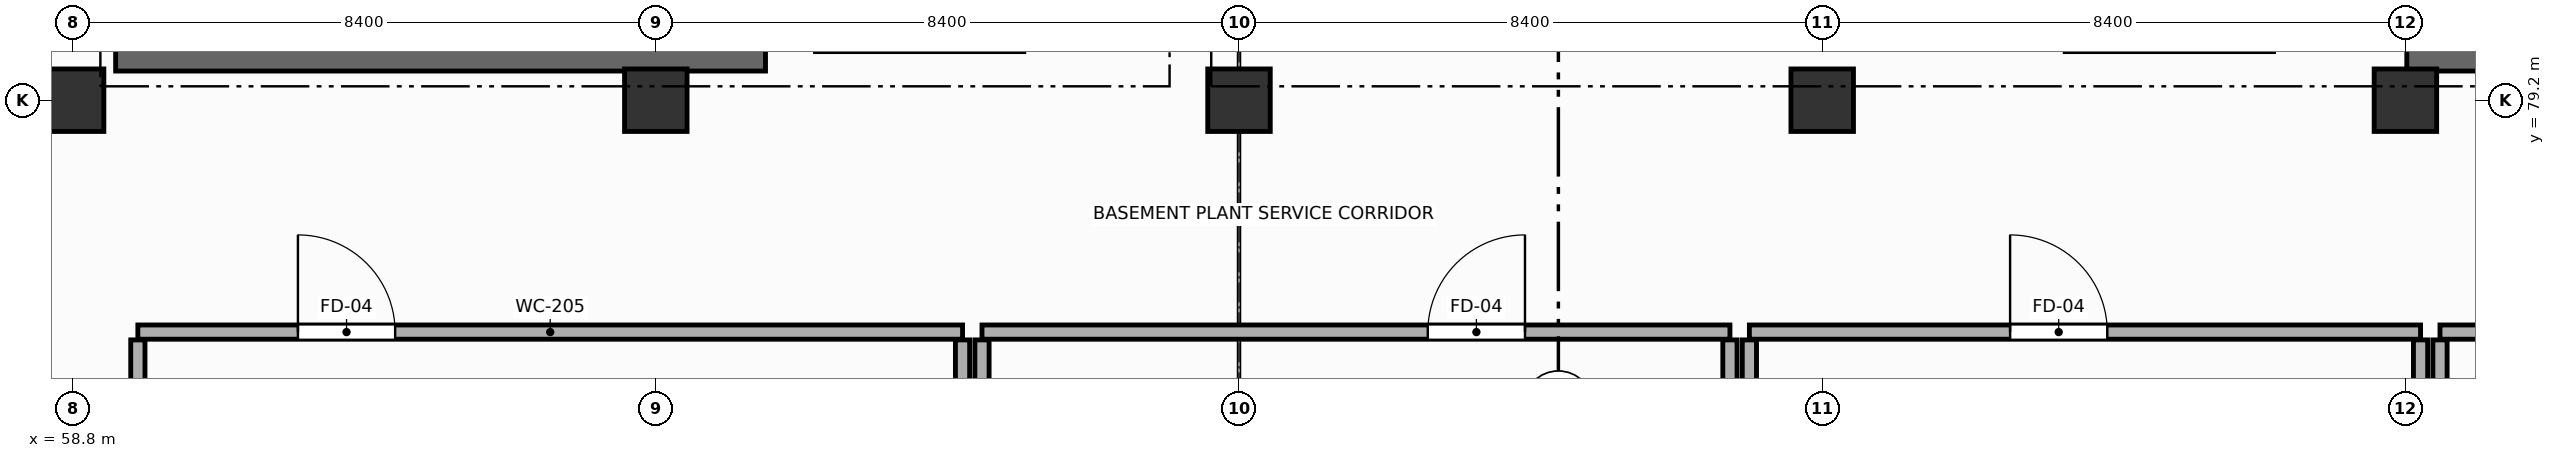
"""IFC4 building model, lengths in metres.
Left out: names, types, materials, properties, quantities, classifications, styles, units other than length and angle.
Written with IfcOpenShell. Run it as: python <this file> out.ifc"""

import sys

from ifc_helpers import new_model, si_unit, direction, frame, frame_2d, origin, origin_2d, place, context, subcontext, project, spatial, rectangle, extrude, element, fill, save


model = new_model("IFC4")
c1 = context("Model", 3, precision=1e-05, world=origin(), true_north=direction((0.0, 1.0)))
c2 = subcontext(c1, "Body", "Model", "MODEL_VIEW")
j1 = project(units=[si_unit("LENGTHUNIT", "METRE"), si_unit("PLANEANGLEUNIT", "RADIAN")], contexts=[c1])
p1 = place(None, origin())
s1 = spatial("IfcSite", under=j1, at=p1, CompositionType="ELEMENT")
p2 = place(p1, origin())
s2 = spatial("IfcBuilding", under=s1, at=p2, CompositionType="ELEMENT")
p3 = place(p2, frame((0.0, 0.0, -4.8)))
s3 = spatial("IfcBuildingStorey", under=s2, at=p3, CompositionType="ELEMENT", Elevation=-4.8)
for number, where, z_axis, x_axis in (
    (1, (58.8, 79.2, -0.42), (0.0, 0.0, 1.0), (1.0, 0.0, 0.0)),
    (2, (67.2, 79.2, -0.42), (0.0, 0.0, 1.0), (1.0, 0.0, 0.0)),
    (3, (75.6, 79.2, -0.42), (0.0, 0.0, 1.0), (1.0, 0.0, 0.0)),
    (4, (84.0, 79.2, -0.42), (0.0, 0.0, 1.0), (1.0, 0.0, 0.0)),
    (5, (92.4, 79.2, -0.42), (0.0, 0.0, 1.0), (1.0, 0.0, 0.0)),
):
    element("IfcColumn", number, at=place(p3, frame(where, z_axis=z_axis, x_axis=x_axis)), inside=s3, PredefinedType="COLUMN", context=c2, shape_type="SweptSolid", body=[
        extrude(rectangle(XDim=0.9, YDim=0.9, at=origin_2d()), origin(), (0.0, 0.0, 1.0), 5.22),
    ])
for number, where, z_axis, x_axis in (
    (6, (68.78, 79.8, -0.42), (0.0, 0.0, 1.0), (-1.0, 0.0, 0.0)),
    (7, (101.78, 79.8, -0.42), (0.0, 0.0, 1.0), (-1.0, 0.0, 0.0)),
):
    element("IfcWall", number, at=place(p3, frame(where, z_axis=z_axis, x_axis=x_axis)), inside=s3, PredefinedType="SHEAR", context=c2, shape_type="SweptSolid", body=[
        extrude(rectangle(XDim=9.36, YDim=0.36, at=frame_2d((4.68, 0.0))), origin(), (0.0, 0.0, 1.0), 4.94),
    ])
p4 = place(p3, frame((59.74, 75.86, 0.0), z_axis=(0.0, 0.0, 1.0), x_axis=(1.0, 0.0, 0.0)))
e8 = element("IfcWall", 8, at=p4, inside=s3, PredefinedType="STANDARD", context=c2, shape_type="SweptSolid", body=[
    extrude(rectangle(XDim=11.878, YDim=0.205, at=frame_2d((5.939, 0.0))), origin(), (0.0, 0.0, 1.0), 4.0),
])
p5 = place(p4, frame((2.306, 0.0, 0.0)))
e9 = element("IfcOpeningElement", 9, at=p5, cuts=e8, PredefinedType="OPENING", context=c2, shape_type="SweptSolid", body=[
    extrude(rectangle(XDim=1.4, YDim=2.25, at=frame_2d((0.7, 1.125))), frame((0.0, 0.113, 0.0), z_axis=(0.0, -1.0, 0.0), x_axis=(1.0, 0.0, 0.0)), (0.0, 0.0, 1.0), 0.225),
])
for number, where, z_axis, x_axis in (
    (10, (59.74, 67.669, 0.0), (0.0, 0.0, 1.0), (0.0, 1.0, 0.0)),
    (11, (71.618, 75.748, 0.0), (0.0, 0.0, 1.0), (0.0, -1.0, 0.0)),
):
    element("IfcWall", number, at=place(p3, frame(where, z_axis=z_axis, x_axis=x_axis)), inside=s3, PredefinedType="STANDARD", context=c2, shape_type="SweptSolid", body=[
        extrude(rectangle(XDim=8.079, YDim=0.205, at=frame_2d((4.039, 0.0))), origin(), (0.0, 0.0, 1.0), 3.85),
    ])
p6 = place(p3, frame((71.898, 75.86, 0.0), z_axis=(0.0, 0.0, 1.0), x_axis=(1.0, 0.0, 0.0)))
e12 = element("IfcWall", 12, at=p6, inside=s3, PredefinedType="STANDARD", context=c2, shape_type="SweptSolid", body=[
    extrude(rectangle(XDim=10.773, YDim=0.205, at=frame_2d((5.386, 0.0))), origin(), (0.0, 0.0, 1.0), 4.0),
])
p7 = place(p6, frame((6.421, 0.0, 0.0)))
e13 = element("IfcOpeningElement", 13, at=p7, cuts=e12, PredefinedType="OPENING", context=c2, shape_type="SweptSolid", body=[
    extrude(rectangle(XDim=1.4, YDim=2.25, at=frame_2d((0.7, 1.125))), frame((0.0, 0.113, 0.0), z_axis=(0.0, -1.0, 0.0), x_axis=(1.0, 0.0, 0.0)), (0.0, 0.0, 1.0), 0.225),
])
for number, where, z_axis, x_axis in (
    (14, (71.898, 67.669, 0.0), (0.0, 0.0, 1.0), (0.0, 1.0, 0.0)),
    (15, (82.671, 75.748, 0.0), (0.0, 0.0, 1.0), (0.0, -1.0, 0.0)),
):
    element("IfcWall", number, at=place(p3, frame(where, z_axis=z_axis, x_axis=x_axis)), inside=s3, PredefinedType="STANDARD", context=c2, shape_type="SweptSolid", body=[
        extrude(rectangle(XDim=8.079, YDim=0.205, at=frame_2d((4.039, 0.0))), origin(), (0.0, 0.0, 1.0), 3.85),
    ])
p8 = place(p3, frame((82.951, 75.86, 0.0), z_axis=(0.0, 0.0, 1.0), x_axis=(1.0, 0.0, 0.0)))
e16 = element("IfcWall", 16, at=p8, inside=s3, PredefinedType="STANDARD", context=c2, shape_type="SweptSolid", body=[
    extrude(rectangle(XDim=9.667, YDim=0.205, at=frame_2d((4.833, 0.0))), origin(), (0.0, 0.0, 1.0), 4.0),
])
p9 = place(p8, frame((3.755, 0.0, 0.0)))
e17 = element("IfcOpeningElement", 17, at=p9, cuts=e16, PredefinedType="OPENING", context=c2, shape_type="SweptSolid", body=[
    extrude(rectangle(XDim=1.4, YDim=2.25, at=frame_2d((0.7, 1.125))), frame((0.0, 0.113, 0.0), z_axis=(0.0, -1.0, 0.0), x_axis=(1.0, 0.0, 0.0)), (0.0, 0.0, 1.0), 0.225),
])
p10 = place(p3, frame((82.951, 67.669, 0.0), z_axis=(0.0, 0.0, 1.0), x_axis=(0.0, 1.0, 0.0)))
e18 = element("IfcWall", 18, at=p10, inside=s3, PredefinedType="STANDARD", context=c2, shape_type="SweptSolid", body=[
    extrude(rectangle(XDim=8.079, YDim=0.205, at=frame_2d((4.039, 0.0))), origin(), (0.0, 0.0, 1.0), 3.85),
])
p11 = place(p3, frame((92.618, 75.748, 0.0), z_axis=(0.0, 0.0, 1.0), x_axis=(0.0, -1.0, 0.0)))
e19 = element("IfcWall", 19, at=p11, inside=s3, PredefinedType="STANDARD", context=c2, shape_type="SweptSolid", body=[
    extrude(rectangle(XDim=8.079, YDim=0.205, at=frame_2d((4.039, 0.0))), origin(), (0.0, 0.0, 1.0), 3.55),
])
p12 = place(p3, frame((92.898, 75.86, 0.0), z_axis=(0.0, 0.0, 1.0), x_axis=(1.0, 0.0, 0.0)))
e20 = element("IfcWall", 20, at=p12, inside=s3, PredefinedType="STANDARD", context=c2, shape_type="SweptSolid", body=[
    extrude(rectangle(XDim=8.562, YDim=0.205, at=frame_2d((4.281, 0.0))), origin(), (0.0, 0.0, 1.0), 4.505),
])
p13 = place(p12, frame((1.966, 0.0, 0.0)))
e21 = element("IfcOpeningElement", 21, at=p13, cuts=e20, PredefinedType="OPENING", context=c2, shape_type="SweptSolid", body=[
    extrude(rectangle(XDim=1.4, YDim=2.25, at=frame_2d((0.7, 1.125))), frame((0.0, 0.113, 0.0), z_axis=(0.0, -1.0, 0.0), x_axis=(1.0, 0.0, 0.0)), (0.0, 0.0, 1.0), 0.225),
])
p14 = place(p3, frame((92.898, 67.669, 0.0), z_axis=(0.0, 0.0, 1.0), x_axis=(0.0, 1.0, 0.0)))
e22 = element("IfcWall", 22, at=p14, inside=s3, PredefinedType="STANDARD", context=c2, shape_type="SweptSolid", body=[
    extrude(rectangle(XDim=8.079, YDim=0.205, at=frame_2d((4.039, 0.0))), origin(), (0.0, 0.0, 1.0), 3.55),
])
p15 = place(p5, origin())
e23 = element("IfcDoor", 23, at=p15, inside=s3, OperationType="SINGLE_SWING_LEFT", PredefinedType="DOOR", context=c2, shape_type="SweptSolid", body=[
    extrude(rectangle(XDim=1.4, YDim=2.25, at=frame_2d((0.7, 1.125))), frame((0.0, 0.025, 0.0), z_axis=(0.0, -1.0, 0.0), x_axis=(1.0, 0.0, 0.0)), (0.0, 0.0, 1.0), 0.05),
])
fill(e9, e23)
p16 = place(p7, origin())
e24 = element("IfcDoor", 24, at=p16, inside=s3, OperationType="SINGLE_SWING_RIGHT", PredefinedType="DOOR", context=c2, shape_type="SweptSolid", body=[
    extrude(rectangle(XDim=1.4, YDim=2.25, at=frame_2d((0.7, 1.125))), frame((0.0, 0.025, 0.0), z_axis=(0.0, -1.0, 0.0), x_axis=(1.0, 0.0, 0.0)), (0.0, 0.0, 1.0), 0.05),
])
fill(e13, e24)
p17 = place(p9, origin())
e25 = element("IfcDoor", 25, at=p17, inside=s3, OperationType="SINGLE_SWING_LEFT", PredefinedType="DOOR", context=c2, shape_type="SweptSolid", body=[
    extrude(rectangle(XDim=1.4, YDim=2.25, at=frame_2d((0.7, 1.125))), frame((0.0, 0.025, 0.0), z_axis=(0.0, -1.0, 0.0), x_axis=(1.0, 0.0, 0.0)), (0.0, 0.0, 1.0), 0.05),
])
fill(e17, e25)
save(model, sys.argv[1])
